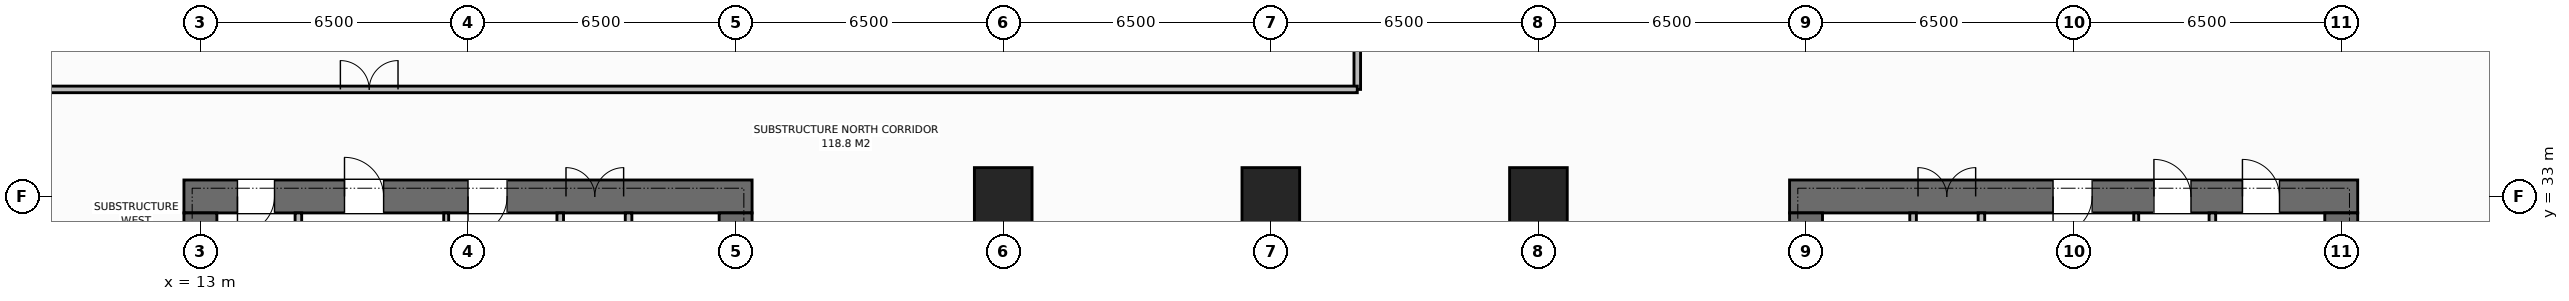
"""IFC4 building model, lengths in metres.
Left out: names, types, materials, properties, quantities, classifications, styles, units other than length and angle.
Written with IfcOpenShell. Run it as: python <this file> out.ifc"""

import sys

from ifc_helpers import new_model, si_unit, direction, frame, frame_2d, origin, origin_2d, place, context, subcontext, project, spatial, rectangle, extrude, element, fill, save


model = new_model("IFC4")
c1 = context("Model", 3, precision=1e-05, world=origin(), true_north=direction((0.0, 1.0)))
c2 = subcontext(c1, "Body", "Model", "MODEL_VIEW")
j1 = project(units=[si_unit("LENGTHUNIT", "METRE"), si_unit("PLANEANGLEUNIT", "RADIAN")], contexts=[c1])
p1 = place(None, origin())
s1 = spatial("IfcSite", under=j1, at=p1, CompositionType="ELEMENT")
p2 = place(p1, origin())
s2 = spatial("IfcBuilding", under=s1, at=p2, CompositionType="ELEMENT")
p3 = place(p2, frame((0.0, 0.0, -13.5)))
s3 = spatial("IfcBuildingStorey", under=s2, at=p3, CompositionType="ELEMENT", Elevation=-13.5)
p4 = place(p3, frame((12.6, 33.0, 0.0), z_axis=(0.0, 0.0, 1.0), x_axis=(1.0, 0.0, 0.0)))
e1 = element("IfcWall", 1, at=p4, inside=s3, PredefinedType="SHEAR", context=c2, shape_type="SweptSolid", body=[
    extrude(rectangle(XDim=13.8, YDim=0.8, at=frame_2d((6.9, 0.0))), origin(), (0.0, 0.0, 1.0), 4.5),
])
p5 = place(p4, frame((1.3, 0.0, 0.0)))
e2 = element("IfcOpeningElement", 2, at=p5, cuts=e1, PredefinedType="OPENING", context=c2, shape_type="SweptSolid", body=[
    extrude(rectangle(XDim=0.9, YDim=2.15, at=frame_2d((0.45, 1.075))), frame((0.0, 0.41, 0.0), z_axis=(0.0, -1.0, 0.0), x_axis=(1.0, 0.0, 0.0)), (0.0, 0.0, 1.0), 0.82),
])
p6 = place(p4, frame((3.9, 0.0, 0.0)))
e3 = element("IfcOpeningElement", 3, at=p6, cuts=e1, PredefinedType="OPENING", context=c2, shape_type="SweptSolid", body=[
    extrude(rectangle(XDim=0.95, YDim=2.15, at=frame_2d((0.475, 1.075))), frame((0.0, 0.41, 0.0), z_axis=(0.0, -1.0, 0.0), x_axis=(1.0, 0.0, 0.0)), (0.0, 0.0, 1.0), 0.82),
])
p7 = place(p4, frame((6.9, 0.0, 0.0)))
e4 = element("IfcOpeningElement", 4, at=p7, cuts=e1, PredefinedType="OPENING", context=c2, shape_type="SweptSolid", body=[
    extrude(rectangle(XDim=0.95, YDim=2.15, at=frame_2d((0.475, 1.075))), frame((0.0, 0.41, 0.0), z_axis=(0.0, -1.0, 0.0), x_axis=(1.0, 0.0, 0.0)), (0.0, 0.0, 1.0), 0.82),
])
p8 = place(p4, frame((9.28, 0.0, 0.0)))
e5 = element("IfcOpeningElement", 5, at=p8, cuts=e1, PredefinedType="OPENING", context=c2, shape_type="SweptSolid", body=[
    extrude(rectangle(XDim=1.4, YDim=2.2, at=frame_2d((0.7, 1.1))), frame((0.0, 0.41, 0.0), z_axis=(0.0, -1.0, 0.0), x_axis=(1.0, 0.0, 0.0)), (0.0, 0.0, 1.0), 0.82),
])
p9 = place(p3, frame((13.0, 19.4, 0.0), z_axis=(0.0, 0.0, 1.0), x_axis=(0.0, 1.0, 0.0)))
e6 = element("IfcWall", 6, at=p9, inside=s3, PredefinedType="SHEAR", context=c2, shape_type="SweptSolid", body=[
    extrude(rectangle(XDim=13.2, YDim=0.8, at=frame_2d((6.6, 0.0))), origin(), (0.0, 0.0, 1.0), 4.5),
])
p10 = place(p9, frame((4.65, 0.0, 0.0)))
e7 = element("IfcOpeningElement", 7, at=p10, cuts=e6, PredefinedType="OPENING", context=c2, shape_type="SweptSolid", body=[
    extrude(rectangle(XDim=1.4, YDim=2.2, at=frame_2d((0.7, 1.1))), frame((0.0, 0.41, 0.0), z_axis=(0.0, -1.0, 0.0), x_axis=(1.0, 0.0, 0.0)), (0.0, 0.0, 1.0), 0.82),
])
p11 = place(p3, frame((26.0, 19.4, 0.0), z_axis=(0.0, 0.0, 1.0), x_axis=(0.0, 1.0, 0.0)))
e8 = element("IfcWall", 8, at=p11, inside=s3, PredefinedType="SHEAR", context=c2, shape_type="SweptSolid", body=[
    extrude(rectangle(XDim=13.2, YDim=0.8, at=frame_2d((6.6, 0.0))), origin(), (0.0, 0.0, 1.0), 4.5),
])
p12 = place(p3, frame((51.6, 33.0, 0.0), z_axis=(0.0, 0.0, 1.0), x_axis=(1.0, 0.0, 0.0)))
e9 = element("IfcWall", 9, at=p12, inside=s3, PredefinedType="SHEAR", context=c2, shape_type="SweptSolid", body=[
    extrude(rectangle(XDim=13.8, YDim=0.8, at=frame_2d((6.9, 0.0))), origin(), (0.0, 0.0, 1.0), 4.5),
])
p13 = place(p12, frame((3.12, 0.0, 0.0)))
e10 = element("IfcOpeningElement", 10, at=p13, cuts=e9, PredefinedType="OPENING", context=c2, shape_type="SweptSolid", body=[
    extrude(rectangle(XDim=1.4, YDim=2.2, at=frame_2d((0.7, 1.1))), frame((0.0, 0.41, 0.0), z_axis=(0.0, -1.0, 0.0), x_axis=(1.0, 0.0, 0.0)), (0.0, 0.0, 1.0), 0.82),
])
p14 = place(p12, frame((11.0, 0.0, 0.0)))
e11 = element("IfcOpeningElement", 11, at=p14, cuts=e9, PredefinedType="OPENING", context=c2, shape_type="SweptSolid", body=[
    extrude(rectangle(XDim=0.9, YDim=2.15, at=frame_2d((0.45, 1.075))), frame((0.0, 0.41, 0.0), z_axis=(0.0, -1.0, 0.0), x_axis=(1.0, 0.0, 0.0)), (0.0, 0.0, 1.0), 0.82),
])
p15 = place(p12, frame((6.4, 0.0, 0.0)))
e12 = element("IfcOpeningElement", 12, at=p15, cuts=e9, PredefinedType="OPENING", context=c2, shape_type="SweptSolid", body=[
    extrude(rectangle(XDim=0.95, YDim=2.15, at=frame_2d((0.475, 1.075))), frame((0.0, 0.41, 0.0), z_axis=(0.0, -1.0, 0.0), x_axis=(1.0, 0.0, 0.0)), (0.0, 0.0, 1.0), 0.82),
])
p16 = place(p12, frame((8.85, 0.0, 0.0)))
e13 = element("IfcOpeningElement", 13, at=p16, cuts=e9, PredefinedType="OPENING", context=c2, shape_type="SweptSolid", body=[
    extrude(rectangle(XDim=0.9, YDim=2.15, at=frame_2d((0.45, 1.075))), frame((0.0, 0.41, 0.0), z_axis=(0.0, -1.0, 0.0), x_axis=(1.0, 0.0, 0.0)), (0.0, 0.0, 1.0), 0.82),
])
p17 = place(p3, frame((52.0, 19.4, 0.0), z_axis=(0.0, 0.0, 1.0), x_axis=(0.0, 1.0, 0.0)))
e14 = element("IfcWall", 14, at=p17, inside=s3, PredefinedType="SHEAR", context=c2, shape_type="SweptSolid", body=[
    extrude(rectangle(XDim=13.2, YDim=0.8, at=frame_2d((6.6, 0.0))), origin(), (0.0, 0.0, 1.0), 4.5),
])
p18 = place(p3, frame((65.0, 19.4, 0.0), z_axis=(0.0, 0.0, 1.0), x_axis=(0.0, 1.0, 0.0)))
e15 = element("IfcWall", 15, at=p18, inside=s3, PredefinedType="SHEAR", context=c2, shape_type="SweptSolid", body=[
    extrude(rectangle(XDim=13.2, YDim=0.8, at=frame_2d((6.6, 0.0))), origin(), (0.0, 0.0, 1.0), 4.5),
])
p19 = place(p18, frame((8.05, 0.0, 0.0)))
e16 = element("IfcOpeningElement", 16, at=p19, cuts=e15, PredefinedType="OPENING", context=c2, shape_type="SweptSolid", body=[
    extrude(rectangle(XDim=1.3, YDim=2.2, at=frame_2d((0.65, 1.1))), frame((0.0, 0.41, 0.0), z_axis=(0.0, -1.0, 0.0), x_axis=(1.0, 0.0, 0.0)), (0.0, 0.0, 1.0), 0.82),
])
for number, where, z_axis, x_axis in (
    (17, (32.5, 33.0, 0.0), (0.0, 0.0, 1.0), (1.0, 0.0, 0.0)),
    (18, (39.0, 33.0, 0.0), (0.0, 0.0, 1.0), (1.0, 0.0, 0.0)),
    (19, (45.5, 33.0, 0.0), (0.0, 0.0, 1.0), (1.0, 0.0, 0.0)),
):
    element("IfcColumn", number, at=place(p3, frame(where, z_axis=z_axis, x_axis=x_axis)), inside=s3, PredefinedType="COLUMN", context=c2, shape_type="SweptSolid", body=[
        extrude(rectangle(XDim=1.4, YDim=1.4, at=origin_2d()), origin(), (0.0, 0.0, 1.0), 4.5),
    ])
p20 = place(p3, frame((15.38, 26.56, 0.0), z_axis=(0.0, 0.0, 1.0), x_axis=(0.0, 1.0, 0.0)))
e20 = element("IfcWall", 20, at=p20, inside=s3, PredefinedType="STANDARD", context=c2, shape_type="SweptSolid", body=[
    extrude(rectangle(XDim=6.04, YDim=0.16, at=frame_2d((3.02, 0.0))), origin(), (0.0, 0.0, 1.0), 4.2),
])
p21 = place(p3, frame((18.97, 26.56, 0.0), z_axis=(0.0, 0.0, 1.0), x_axis=(0.0, 1.0, 0.0)))
e21 = element("IfcWall", 21, at=p21, inside=s3, PredefinedType="PARTITIONING", context=c2, shape_type="SweptSolid", body=[
    extrude(rectangle(XDim=6.04, YDim=0.12, at=frame_2d((3.02, 0.0))), origin(), (0.0, 0.0, 1.0), 4.2),
])
p22 = place(p3, frame((21.74, 26.56, 0.0), z_axis=(0.0, 0.0, 1.0), x_axis=(0.0, 1.0, 0.0)))
e22 = element("IfcWall", 22, at=p22, inside=s3, PredefinedType="STANDARD", context=c2, shape_type="SweptSolid", body=[
    extrude(rectangle(XDim=6.04, YDim=0.16, at=frame_2d((3.02, 0.0))), origin(), (0.0, 0.0, 1.0), 4.2),
])
p23 = place(p3, frame((23.4, 19.4, 0.0), z_axis=(0.0, 0.0, 1.0), x_axis=(0.0, 1.0, 0.0)))
e23 = element("IfcWall", 23, at=p23, inside=s3, PredefinedType="STANDARD", context=c2, shape_type="SweptSolid", body=[
    extrude(rectangle(XDim=13.2, YDim=0.16, at=frame_2d((6.6, 0.0))), origin(), (0.0, 0.0, 1.0), 4.2),
])
p24 = place(p23, frame((1.2, 0.0, 0.0)))
e24 = element("IfcOpeningElement", 24, at=p24, cuts=e23, PredefinedType="OPENING", context=c2, shape_type="SweptSolid", body=[
    extrude(rectangle(XDim=0.95, YDim=2.15, at=frame_2d((0.475, 1.075))), frame((0.0, 0.09, 0.0), z_axis=(0.0, -1.0, 0.0), x_axis=(1.0, 0.0, 0.0)), (0.0, 0.0, 1.0), 0.18),
])
p25 = place(p3, frame((54.6, 19.4, 0.0), z_axis=(0.0, 0.0, 1.0), x_axis=(0.0, 1.0, 0.0)))
e25 = element("IfcWall", 25, at=p25, inside=s3, PredefinedType="STANDARD", context=c2, shape_type="SweptSolid", body=[
    extrude(rectangle(XDim=13.2, YDim=0.16, at=frame_2d((6.6, 0.0))), origin(), (0.0, 0.0, 1.0), 4.2),
])
p26 = place(p25, frame((1.2, 0.0, 0.0)))
e26 = element("IfcOpeningElement", 26, at=p26, cuts=e25, PredefinedType="OPENING", context=c2, shape_type="SweptSolid", body=[
    extrude(rectangle(XDim=0.95, YDim=2.15, at=frame_2d((0.475, 1.075))), frame((0.0, 0.09, 0.0), z_axis=(0.0, -1.0, 0.0), x_axis=(1.0, 0.0, 0.0)), (0.0, 0.0, 1.0), 0.18),
])
p27 = place(p3, frame((56.26, 23.09, 0.0), z_axis=(0.0, 0.0, 1.0), x_axis=(0.0, 1.0, 0.0)))
e27 = element("IfcWall", 27, at=p27, inside=s3, PredefinedType="STANDARD", context=c2, shape_type="SweptSolid", body=[
    extrude(rectangle(XDim=9.51, YDim=0.16, at=frame_2d((4.755, 0.0))), origin(), (0.0, 0.0, 1.0), 4.2),
])
p28 = place(p27, frame((1.01, 0.0, 0.0)))
e28 = element("IfcOpeningElement", 28, at=p28, cuts=e27, PredefinedType="OPENING", context=c2, shape_type="SweptSolid", body=[
    extrude(rectangle(XDim=1.3, YDim=2.2, at=frame_2d((0.65, 1.1))), frame((0.0, 0.09, 0.0), z_axis=(0.0, -1.0, 0.0), x_axis=(1.0, 0.0, 0.0)), (0.0, 0.0, 1.0), 0.18),
])
p29 = place(p3, frame((61.87, 26.56, 0.0), z_axis=(0.0, 0.0, 1.0), x_axis=(0.0, 1.0, 0.0)))
e29 = element("IfcWall", 29, at=p29, inside=s3, PredefinedType="STANDARD", context=c2, shape_type="SweptSolid", body=[
    extrude(rectangle(XDim=6.04, YDim=0.16, at=frame_2d((3.02, 0.0))), origin(), (0.0, 0.0, 1.0), 4.2),
])
p30 = place(p3, frame((60.02, 26.56, 0.0), z_axis=(0.0, 0.0, 1.0), x_axis=(0.0, 1.0, 0.0)))
e30 = element("IfcWall", 30, at=p30, inside=s3, PredefinedType="PARTITIONING", context=c2, shape_type="SweptSolid", body=[
    extrude(rectangle(XDim=6.04, YDim=0.12, at=frame_2d((3.02, 0.0))), origin(), (0.0, 0.0, 1.0), 4.2),
])
p31 = place(p3, frame((41.1, 35.6, 0.0), z_axis=(0.0, 0.0, 1.0), x_axis=(0.0, 1.0, 0.0)))
e31 = element("IfcWall", 31, at=p31, inside=s3, PredefinedType="STANDARD", context=c2, shape_type="SweptSolid", body=[
    extrude(rectangle(XDim=16.0, YDim=0.16, at=frame_2d((8.0, 0.0))), origin(), (0.0, 0.0, 1.0), 4.2),
])
p32 = place(p3, frame((0.4, 35.6, 0.0), z_axis=(0.0, 0.0, 1.0), x_axis=(1.0, 0.0, 0.0)))
e32 = element("IfcWall", 32, at=p32, inside=s3, PredefinedType="STANDARD", context=c2, shape_type="SweptSolid", body=[
    extrude(rectangle(XDim=40.7, YDim=0.16, at=frame_2d((20.35, 0.0))), origin(), (0.0, 0.0, 1.0), 4.2),
])
p33 = place(p32, frame((16.0, 0.0, 0.0)))
e33 = element("IfcOpeningElement", 33, at=p33, cuts=e32, PredefinedType="OPENING", context=c2, shape_type="SweptSolid", body=[
    extrude(rectangle(XDim=1.4, YDim=2.2, at=frame_2d((0.7, 1.1))), frame((0.0, 0.09, 0.0), z_axis=(0.0, -1.0, 0.0), x_axis=(1.0, 0.0, 0.0)), (0.0, 0.0, 1.0), 0.18),
])
p34 = place(p5, origin())
e34 = element("IfcDoor", 34, at=p34, inside=s3, OperationType="SINGLE_SWING_RIGHT", PredefinedType="DOOR", context=c2, shape_type="SweptSolid", body=[
    extrude(rectangle(XDim=0.9, YDim=2.15, at=frame_2d((0.45, 1.075))), frame((0.0, -0.075, 0.0), z_axis=(0.0, -1.0, 0.0), x_axis=(1.0, 0.0, 0.0)), (0.0, 0.0, 1.0), 0.05),
])
fill(e2, e34)
p35 = place(p6, origin())
e35 = element("IfcDoor", 35, at=p35, inside=s3, OperationType="SINGLE_SWING_LEFT", PredefinedType="DOOR", context=c2, shape_type="SweptSolid", body=[
    extrude(rectangle(XDim=0.95, YDim=2.15, at=frame_2d((0.475, 1.075))), frame((0.0, -0.075, 0.0), z_axis=(0.0, -1.0, 0.0), x_axis=(1.0, 0.0, 0.0)), (0.0, 0.0, 1.0), 0.05),
])
fill(e3, e35)
p36 = place(p7, origin())
e36 = element("IfcDoor", 36, at=p36, inside=s3, OperationType="SINGLE_SWING_RIGHT", PredefinedType="DOOR", context=c2, shape_type="SweptSolid", body=[
    extrude(rectangle(XDim=0.95, YDim=2.15, at=frame_2d((0.475, 1.075))), frame((0.0, -0.075, 0.0), z_axis=(0.0, -1.0, 0.0), x_axis=(1.0, 0.0, 0.0)), (0.0, 0.0, 1.0), 0.05),
])
fill(e4, e36)
p37 = place(p8, origin())
e37 = element("IfcDoor", 37, at=p37, inside=s3, OperationType="DOUBLE_DOOR_SINGLE_SWING", PredefinedType="DOOR", context=c2, shape_type="SweptSolid", body=[
    extrude(rectangle(XDim=1.4, YDim=2.2, at=frame_2d((0.7, 1.1))), frame((0.0, -0.075, 0.0), z_axis=(0.0, -1.0, 0.0), x_axis=(1.0, 0.0, 0.0)), (0.0, 0.0, 1.0), 0.05),
])
fill(e5, e37)
p38 = place(p13, origin())
e38 = element("IfcDoor", 38, at=p38, inside=s3, OperationType="DOUBLE_DOOR_SINGLE_SWING", PredefinedType="DOOR", context=c2, shape_type="SweptSolid", body=[
    extrude(rectangle(XDim=1.4, YDim=2.2, at=frame_2d((0.7, 1.1))), frame((0.0, -0.075, 0.0), z_axis=(0.0, -1.0, 0.0), x_axis=(1.0, 0.0, 0.0)), (0.0, 0.0, 1.0), 0.05),
])
fill(e10, e38)
p39 = place(p14, origin())
e39 = element("IfcDoor", 39, at=p39, inside=s3, OperationType="SINGLE_SWING_LEFT", PredefinedType="DOOR", context=c2, shape_type="SweptSolid", body=[
    extrude(rectangle(XDim=0.9, YDim=2.15, at=frame_2d((0.45, 1.075))), frame((0.0, -0.075, 0.0), z_axis=(0.0, -1.0, 0.0), x_axis=(1.0, 0.0, 0.0)), (0.0, 0.0, 1.0), 0.05),
])
fill(e11, e39)
p40 = place(p15, origin())
e40 = element("IfcDoor", 40, at=p40, inside=s3, OperationType="SINGLE_SWING_RIGHT", PredefinedType="DOOR", context=c2, shape_type="SweptSolid", body=[
    extrude(rectangle(XDim=0.95, YDim=2.15, at=frame_2d((0.475, 1.075))), frame((0.0, -0.075, 0.0), z_axis=(0.0, -1.0, 0.0), x_axis=(1.0, 0.0, 0.0)), (0.0, 0.0, 1.0), 0.05),
])
fill(e12, e40)
p41 = place(p16, origin())
e41 = element("IfcDoor", 41, at=p41, inside=s3, OperationType="SINGLE_SWING_LEFT", PredefinedType="DOOR", context=c2, shape_type="SweptSolid", body=[
    extrude(rectangle(XDim=0.9, YDim=2.15, at=frame_2d((0.45, 1.075))), frame((0.0, -0.075, 0.0), z_axis=(0.0, -1.0, 0.0), x_axis=(1.0, 0.0, 0.0)), (0.0, 0.0, 1.0), 0.05),
])
fill(e13, e41)
p42 = place(p33, origin())
e42 = element("IfcDoor", 42, at=p42, inside=s3, OperationType="DOUBLE_DOOR_SINGLE_SWING", PredefinedType="DOOR", context=c2, shape_type="SweptSolid", body=[
    extrude(rectangle(XDim=1.4, YDim=2.2, at=frame_2d((0.7, 1.1))), frame((0.0, 0.025, 0.0), z_axis=(0.0, -1.0, 0.0), x_axis=(1.0, 0.0, 0.0)), (0.0, 0.0, 1.0), 0.05),
])
fill(e33, e42)
save(model, sys.argv[1])
